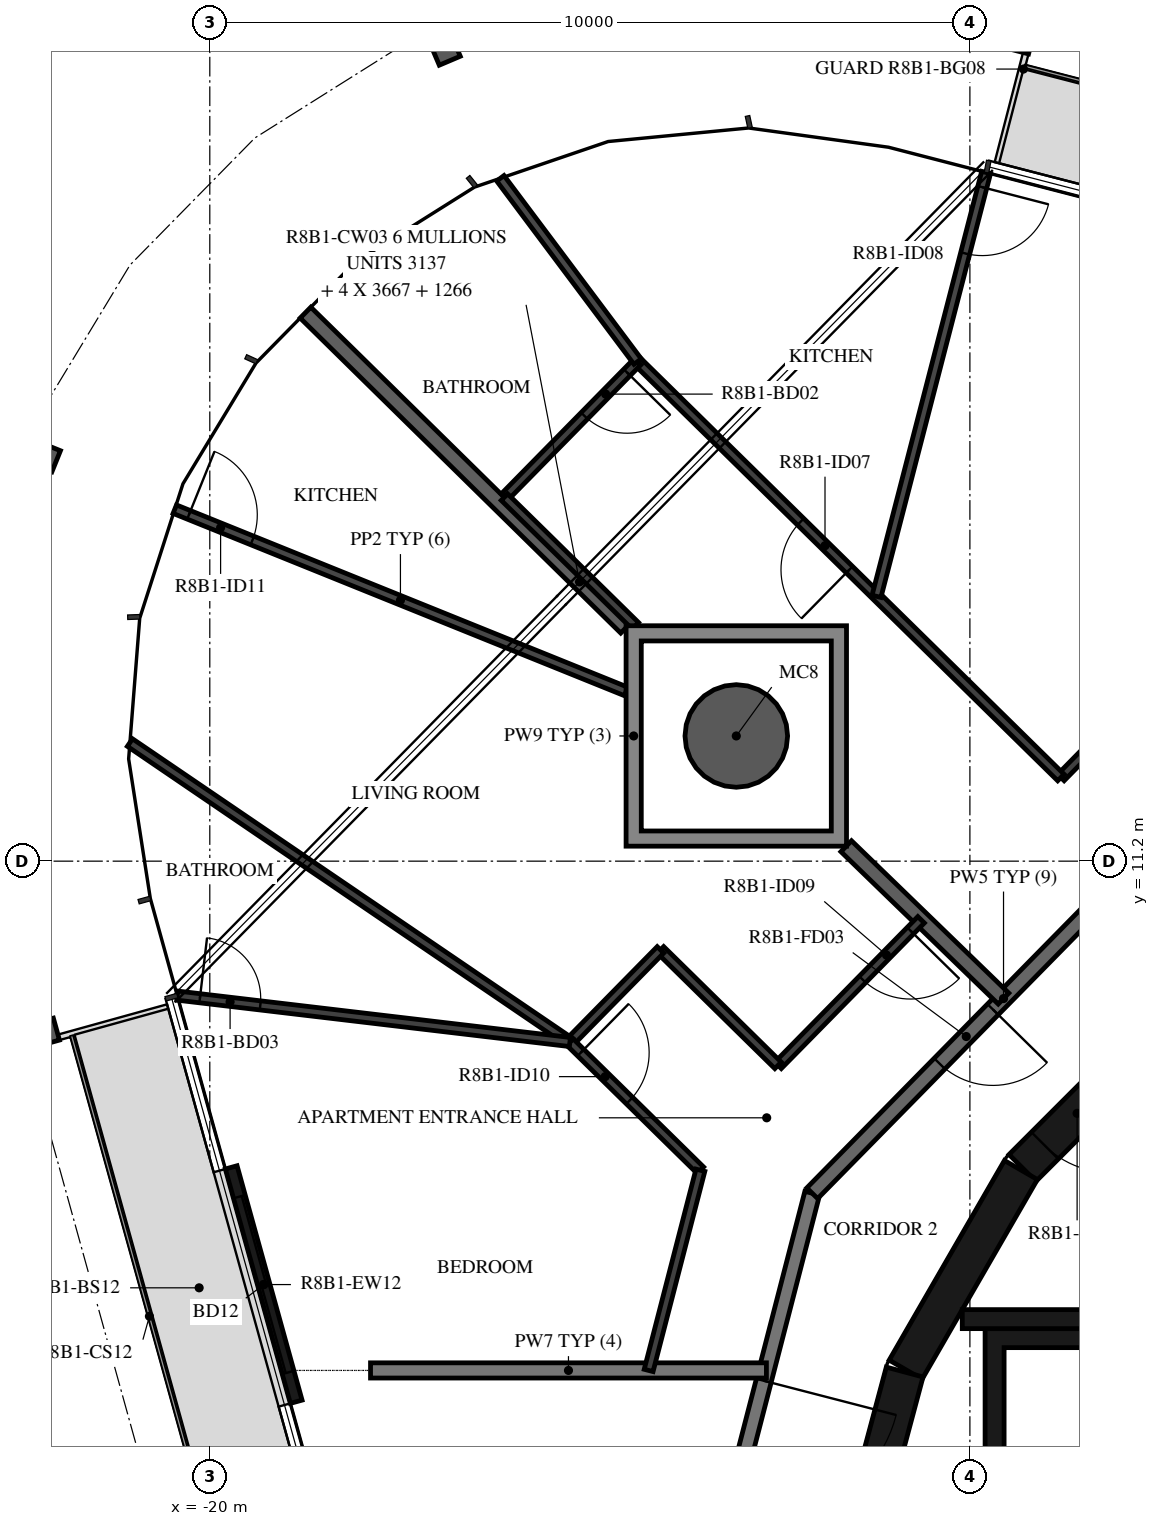
"""IFC4 building model, lengths in metres.
Left out: names, types, materials, properties, quantities, classifications, styles, units other than length and angle.
Written with IfcOpenShell. Run it as: python <this file> out.ifc"""

import sys

from ifc_helpers import new_model, si_unit, direction, frame, frame_2d, origin, origin_2d, place, context, subcontext, project, spatial, polyline, rectangle, hollow_circle, i_section, outline, extrude, element, fill, save


model = new_model("IFC4")
c1 = context("Model", 3, precision=1e-05, world=origin(), true_north=direction((0.0, 1.0)))
c2 = subcontext(c1, "Body", "Model", "MODEL_VIEW")
j1 = project(units=[si_unit("LENGTHUNIT", "METRE"), si_unit("PLANEANGLEUNIT", "RADIAN")], contexts=[c1])
p1 = place(None, origin())
s1 = spatial("IfcSite", under=j1, at=p1, CompositionType="ELEMENT")
p2 = place(p1, origin())
s2 = spatial("IfcBuilding", under=s1, at=p2, CompositionType="ELEMENT")
p3 = place(p2, frame((0.0, 0.0, 308.7)))
s3 = spatial("IfcBuildingStorey", under=s2, at=p3, CompositionType="ELEMENT", Elevation=308.7)
p4 = place(p3, frame((-13.073, 12.847, -0.38), z_axis=(0.0, 0.0, 1.0), x_axis=(1.0, 0.0, 0.0)))
e1 = element("IfcColumn", 1, at=p4, inside=s3, PredefinedType="COLUMN", context=c2, shape_type="SweptSolid", body=[
    extrude(hollow_circle(Radius=0.675, WallThickness=0.03, at=origin_2d()), origin(), (0.0, 0.0, 1.0), 3.5),
])
for number, where, z_axis, x_axis in (
    (2, (-9.261, 22.293, -0.38), (0.0, 0.0, 1.0), (0.968, -0.25, 0.0)),
    (3, (-17.019, 22.145, -0.38), (0.0, 0.0, 1.0), (0.921, 0.391, 0.0)),
    (4, (-22.438, 16.629, -0.38), (0.0, 0.0, 1.0), (0.374, 0.927, 0.0)),
    (5, (-22.452, 8.87, -0.38), (0.0, 0.0, 1.0), (-0.267, 0.964, 0.0)),
):
    element("IfcColumn", number, at=place(p3, frame(where, z_axis=z_axis, x_axis=x_axis)), inside=s3, PredefinedType="COLUMN", context=c2, shape_type="SweptSolid", body=[
        extrude(i_section(OverallWidth=0.3, OverallDepth=0.9, WebThickness=0.019, FlangeThickness=0.035, FilletRadius=0.03, at=origin_2d()), origin(), (0.0, 0.0, 1.0), 3.5),
    ])
p5 = place(p3, frame((-19.718, 7.171, 0.0), z_axis=(0.0, 0.0, 1.0), x_axis=(0.267266077957, -0.963622770369, 0.0)))
e6 = element("IfcWall", 6, at=p5, inside=s3, PredefinedType="STANDARD", context=c2, shape_type="SweptSolid", body=[
    extrude(rectangle(XDim=3.2, YDim=0.16, at=frame_2d((1.6, 0.0))), origin(), (0.0, 0.0, 1.0), 3.12),
])
p6 = place(p5, frame((0.4, 0.0, 0.0)))
e7 = element("IfcOpeningElement", 7, at=p6, cuts=e6, PredefinedType="OPENING", context=c2, shape_type="SweptSolid", body=[
    extrude(rectangle(XDim=2.4, YDim=2.4, at=frame_2d((1.2, 1.2))), frame((0.0, 0.09, 0.0), z_axis=(0.0, -1.0, 0.0), x_axis=(1.0, 0.0, 0.0)), (0.0, 0.0, 1.0), 0.18),
])
p7 = place(p3, frame((-7.164, 9.308, 0.0), z_axis=(0.0, 0.0, 1.0), x_axis=(-0.707106781187, -0.707106781187, 0.0)))
e8 = element("IfcWall", 8, at=p7, inside=s3, PredefinedType="SHEAR", context=c2, shape_type="SweptSolid", body=[
    extrude(rectangle(XDim=3.032, YDim=0.5, at=frame_2d((1.516, 0.0))), origin(), (0.0, 0.0, 1.0), 3.12),
])
p8 = place(p7, frame((1.416, 0.0, 0.0)))
e9 = element("IfcOpeningElement", 9, at=p8, cuts=e8, PredefinedType="OPENING", context=c2, shape_type="SweptSolid", body=[
    extrude(rectangle(XDim=1.2, YDim=2.1, at=frame_2d((0.6, 1.05))), frame((0.0, 0.26, 0.0), z_axis=(0.0, -1.0, 0.0), x_axis=(1.0, 0.0, 0.0)), (0.0, 0.0, 1.0), 0.52),
])
for number, where, z_axis, x_axis in (
    (10, (-9.329, 7.137, 0.0), (0.0, 0.0, 1.0), (-0.5, -0.866, 0.0)),
    (11, (-10.858, 4.479, 0.0), (0.0, 0.0, 1.0), (-0.259, -0.966, 0.0)),
):
    element("IfcWall", number, at=place(p3, frame(where, z_axis=z_axis, x_axis=x_axis)), inside=s3, PredefinedType="SHEAR", context=c2, shape_type="SweptSolid", body=[
        extrude(rectangle(XDim=3.033, YDim=0.5, at=frame_2d((1.516, 0.0))), origin(), (0.0, 0.0, 1.0), 3.12),
    ])
p9 = place(p3, frame((-7.0, 5.175, 0.0), z_axis=(0.0, 0.0, 1.0), x_axis=(-1.0, 0.0, 0.0)))
e12 = element("IfcWall", 12, at=p9, inside=s3, PredefinedType="SHEAR", context=c2, shape_type="SweptSolid", body=[
    extrude(rectangle(XDim=3.1, YDim=0.25, at=frame_2d((1.55, 0.0))), origin(), (0.0, 0.0, 1.0), 3.12),
])
p10 = place(p3, origin())
e13 = element("IfcWall", 13, at=p10, inside=s3, PredefinedType="SHEAR", context=c2, shape_type="SweptSolid", body=[
    extrude(outline(polyline([(-9.8, 1.9), (-9.55, 1.9), (-9.55, 4.8), (3.1, 4.8), (3.1, 1.9), (3.35, 1.9), (3.35, 4.8), (5.25, 4.8), (5.25, 1.9), (5.5, 1.9), (5.5, 4.8), (7.4, 4.8), (7.4, 1.9), (7.65, 1.9), (7.65, 4.8), (9.55, 4.8), (9.55, 1.9), (9.8, 1.9), (9.8, 4.8), (9.8, 5.05), (-9.8, 5.05), (-9.8, 4.8), (-9.8, 1.9)])), origin(), (0.0, 0.0, 1.0), 3.12),
])
p11 = place(p3, frame((-12.074, 6.831, 0.0), z_axis=(0.0, 0.0, 1.0), x_axis=(-0.250391063186, -0.968144780225, 0.0)))
e14 = element("IfcWall", 14, at=p11, inside=s3, PredefinedType="STANDARD", context=c2, shape_type="SweptSolid", body=[
    extrude(rectangle(XDim=7.181, YDim=0.2, at=frame_2d((3.591, 0.0))), origin(), (0.0, 0.0, 1.0), 3.12),
])
p12 = place(p11, frame((2.548, 0.0, 0.0)))
e15 = element("IfcOpeningElement", 15, at=p12, cuts=e14, PredefinedType="OPENING", context=c2, shape_type="SweptSolid", body=[
    extrude(rectangle(XDim=1.8, YDim=2.1, at=frame_2d((0.9, 1.05))), frame((0.0, 0.11, 0.0), z_axis=(0.0, -1.0, 0.0), x_axis=(1.0, 0.0, 0.0)), (0.0, 0.0, 1.0), 0.22),
])
p13 = place(p3, frame((-7.041, 11.953, 0.0), z_axis=(0.0, 0.0, 1.0), x_axis=(-0.70090916255, -0.713250549143, 0.0)))
e16 = element("IfcWall", 16, at=p13, inside=s3, PredefinedType="STANDARD", context=c2, shape_type="SweptSolid", body=[
    extrude(rectangle(XDim=7.181, YDim=0.2, at=frame_2d((3.59, 0.0))), origin(), (0.0, 0.0, 1.0), 3.12),
])
p14 = place(p13, frame((3.791, 0.0, 0.0)))
e17 = element("IfcOpeningElement", 17, at=p14, cuts=e16, PredefinedType="OPENING", context=c2, shape_type="SweptSolid", body=[
    extrude(rectangle(XDim=1.0, YDim=2.1, at=frame_2d((0.5, 1.05))), frame((0.0, 0.11, 0.0), z_axis=(0.0, -1.0, 0.0), x_axis=(1.0, 0.0, 0.0)), (0.0, 0.0, 1.0), 0.22),
])
p15 = place(p3, frame((-12.677, 4.5, 0.0), z_axis=(0.0, 0.0, 1.0), x_axis=(-1.0, 0.0, 0.0)))
e18 = element("IfcWall", 18, at=p15, inside=s3, PredefinedType="STANDARD", context=c2, shape_type="SweptSolid", body=[
    extrude(rectangle(XDim=5.208, YDim=0.2, at=frame_2d((2.604, 0.0))), origin(), (0.0, 0.0, 1.0), 3.12),
])
p16 = place(p3, frame((-11.627, 11.396, 0.0), z_axis=(0.0, 0.0, 1.0), x_axis=(0.718328882961, -0.695703683981, 0.0)))
e19 = element("IfcWall", 19, at=p16, inside=s3, PredefinedType="STANDARD", context=c2, shape_type="SweptSolid", body=[
    extrude(rectangle(XDim=2.881, YDim=0.2, at=frame_2d((1.44, 0.0))), origin(), (0.0, 0.0, 1.0), 3.12),
])
p17 = place(p3, frame((-18.741, 18.417, 0.0), z_axis=(0.0, 0.0, 1.0), x_axis=(0.713252414586, -0.700907264256, 0.0)))
e20 = element("IfcWall", 20, at=p17, inside=s3, PredefinedType="STANDARD", context=c2, shape_type="SweptSolid", body=[
    extrude(rectangle(XDim=5.913, YDim=0.2, at=frame_2d((2.957, 0.0))), origin(), (0.0, 0.0, 1.0), 3.12),
])
p18 = place(p3, frame((-7.829, 13.291, 0.0), z_axis=(0.0, 0.0, 1.0), x_axis=(-0.700840583087, -0.713317935494, 0.0)))
e21 = element("IfcWall", 21, at=p18, inside=s3, PredefinedType="PARTITIONING", context=c2, shape_type="SweptSolid", body=[
    extrude(rectangle(XDim=1.389, YDim=0.12, at=frame_2d((0.695, 0.0))), origin(), (0.0, 0.0, 1.0), 3.12),
])
p19 = place(p3, frame((-8.803, 12.3, 0.0), z_axis=(0.0, 0.0, 1.0), x_axis=(-0.713240430861, 0.700919458844, 0.0)))
e22 = element("IfcWall", 22, at=p19, inside=s3, PredefinedType="PARTITIONING", context=c2, shape_type="SweptSolid", body=[
    extrude(rectangle(XDim=7.807, YDim=0.12, at=frame_2d((3.904, 0.0))), origin(), (0.0, 0.0, 1.0), 3.12),
])
p20 = place(p19, frame((3.901, 0.0, 0.0)))
e23 = element("IfcOpeningElement", 23, at=p20, cuts=e22, PredefinedType="OPENING", context=c2, shape_type="SweptSolid", body=[
    extrude(rectangle(XDim=0.9, YDim=2.1, at=frame_2d((0.45, 1.05))), frame((0.0, 0.07, 0.0), z_axis=(0.0, -1.0, 0.0), x_axis=(1.0, 0.0, 0.0)), (0.0, 0.0, 1.0), 0.14),
])
p21 = place(p3, frame((-14.371, 17.772, 0.0), z_axis=(0.0, 0.0, 1.0), x_axis=(-0.700928101034, -0.713231937859, 0.0)))
e24 = element("IfcWall", 24, at=p21, inside=s3, PredefinedType="PARTITIONING", context=c2, shape_type="SweptSolid", body=[
    extrude(rectangle(XDim=2.5, YDim=0.12, at=frame_2d((1.25, 0.0))), origin(), (0.0, 0.0, 1.0), 3.12),
])
p22 = place(p21, frame((0.2, 0.0, 0.0)))
e25 = element("IfcOpeningElement", 25, at=p22, cuts=e24, PredefinedType="OPENING", context=c2, shape_type="SweptSolid", body=[
    extrude(rectangle(XDim=0.8, YDim=2.1, at=frame_2d((0.4, 1.05))), frame((0.0, 0.07, 0.0), z_axis=(0.0, -1.0, 0.0), x_axis=(1.0, 0.0, 0.0)), (0.0, 0.0, 1.0), 0.14),
])
p23 = place(p3, frame((-16.124, 15.989, 0.0), z_axis=(0.0, 0.0, 1.0), x_axis=(0.713298294795, -0.700860572898, 0.0)))
e26 = element("IfcWall", 26, at=p23, inside=s3, PredefinedType="PARTITIONING", context=c2, shape_type="SweptSolid", body=[
    extrude(rectangle(XDim=2.414, YDim=0.12, at=frame_2d((1.207, 0.0))), origin(), (0.0, 0.0, 1.0), 3.12),
])
p24 = place(p3, frame((-9.787, 20.26, 0.0), z_axis=(0.0, 0.0, 1.0), x_axis=(-0.250397207818, -0.968143191019, 0.0)))
e27 = element("IfcWall", 27, at=p24, inside=s3, PredefinedType="PARTITIONING", context=c2, shape_type="SweptSolid", body=[
    extrude(rectangle(XDim=5.76, YDim=0.12, at=frame_2d((2.88, 0.0))), origin(), (0.0, 0.0, 1.0), 2.73),
])
p25 = place(p24, frame((0.2, 0.0, 0.0)))
e28 = element("IfcOpeningElement", 28, at=p25, cuts=e27, PredefinedType="OPENING", context=c2, shape_type="SweptSolid", body=[
    extrude(rectangle(XDim=0.9, YDim=2.1, at=frame_2d((0.45, 1.05))), frame((0.0, 0.07, 0.0), z_axis=(0.0, -1.0, 0.0), x_axis=(1.0, 0.0, 0.0)), (0.0, 0.0, 1.0), 0.14),
])
p26 = place(p3, frame((-16.177, 20.184, 0.0), z_axis=(0.0, 0.0, 1.0), x_axis=(0.599546131574, -0.800340200237, 0.0)))
e29 = element("IfcWall", 29, at=p26, inside=s3, PredefinedType="PARTITIONING", context=c2, shape_type="SweptSolid", body=[
    extrude(rectangle(XDim=3.013, YDim=0.12, at=frame_2d((1.506, 0.0))), origin(), (0.0, 0.0, 1.0), 2.73),
])
p27 = place(p3, frame((-10.642, 10.429, 0.0), z_axis=(0.0, 0.0, 1.0), x_axis=(-0.700897237058, -0.713262268092, 0.0)))
e30 = element("IfcWall", 30, at=p27, inside=s3, PredefinedType="PARTITIONING", context=c2, shape_type="SweptSolid", body=[
    extrude(rectangle(XDim=2.685, YDim=0.12, at=frame_2d((1.343, 0.0))), origin(), (0.0, 0.0, 1.0), 3.12),
])
p28 = place(p27, frame((0.2, 0.0, 0.0)))
e31 = element("IfcOpeningElement", 31, at=p28, cuts=e30, PredefinedType="OPENING", context=c2, shape_type="SweptSolid", body=[
    extrude(rectangle(XDim=0.9, YDim=2.1, at=frame_2d((0.45, 1.05))), frame((0.0, 0.07, 0.0), z_axis=(0.0, -1.0, 0.0), x_axis=(1.0, 0.0, 0.0)), (0.0, 0.0, 1.0), 0.14),
])
p29 = place(p3, frame((-12.524, 8.513, 0.0), z_axis=(0.0, 0.0, 1.0), x_axis=(-0.713272241211, 0.700887087852, 0.0)))
e32 = element("IfcWall", 32, at=p29, inside=s3, PredefinedType="PARTITIONING", context=c2, shape_type="SweptSolid", body=[
    extrude(rectangle(XDim=2.168, YDim=0.12, at=frame_2d((1.084, 0.0))), origin(), (0.0, 0.0, 1.0), 3.12),
])
p30 = place(p3, frame((-14.071, 10.033, 0.0), z_axis=(0.0, 0.0, 1.0), x_axis=(-0.700903812832, -0.713255806255, 0.0)))
e33 = element("IfcWall", 33, at=p30, inside=s3, PredefinedType="PARTITIONING", context=c2, shape_type="SweptSolid", body=[
    extrude(rectangle(XDim=1.7, YDim=0.12, at=frame_2d((0.85, 0.0))), origin(), (0.0, 0.0, 1.0), 3.12),
])
p31 = place(p3, frame((-15.262, 8.821, 0.0), z_axis=(0.0, 0.0, 1.0), x_axis=(0.713216332019, -0.700943980459, 0.0)))
e34 = element("IfcWall", 34, at=p31, inside=s3, PredefinedType="PARTITIONING", context=c2, shape_type="SweptSolid", body=[
    extrude(rectangle(XDim=2.407, YDim=0.12, at=frame_2d((1.204, 0.0))), origin(), (0.0, 0.0, 1.0), 3.12),
])
p32 = place(p31, frame((0.2, 0.0, 0.0)))
e35 = element("IfcOpeningElement", 35, at=p32, cuts=e34, PredefinedType="OPENING", context=c2, shape_type="SweptSolid", body=[
    extrude(rectangle(XDim=0.9, YDim=2.1, at=frame_2d((0.45, 1.05))), frame((0.0, 0.07, 0.0), z_axis=(0.0, -1.0, 0.0), x_axis=(1.0, 0.0, 0.0)), (0.0, 0.0, 1.0), 0.14),
])
p33 = place(p3, frame((-13.545, 7.134, 0.0), z_axis=(0.0, 0.0, 1.0), x_axis=(-0.250320452157, -0.968163039592, 0.0)))
e36 = element("IfcWall", 36, at=p33, inside=s3, PredefinedType="PARTITIONING", context=c2, shape_type="SweptSolid", body=[
    extrude(rectangle(XDim=2.72, YDim=0.12, at=frame_2d((1.36, 0.0))), origin(), (0.0, 0.0, 1.0), 3.12),
])
p34 = place(p3, frame((-20.46, 15.831, 0.0), z_axis=(0.0, 0.0, 1.0), x_axis=(0.927230380144, -0.374491417977, 0.0)))
e37 = element("IfcWall", 37, at=p34, inside=s3, PredefinedType="PARTITIONING", context=c2, shape_type="SweptSolid", body=[
    extrude(rectangle(XDim=6.403, YDim=0.12, at=frame_2d((3.202, 0.0))), origin(), (0.0, 0.0, 1.0), 2.73),
])
p35 = place(p34, frame((0.2, 0.0, 0.0)))
e38 = element("IfcOpeningElement", 38, at=p35, cuts=e37, PredefinedType="OPENING", context=c2, shape_type="SweptSolid", body=[
    extrude(rectangle(XDim=0.9, YDim=2.1, at=frame_2d((0.45, 1.05))), frame((0.0, 0.07, 0.0), z_axis=(0.0, -1.0, 0.0), x_axis=(1.0, 0.0, 0.0)), (0.0, 0.0, 1.0), 0.14),
])
p36 = place(p3, frame((-21.051, 12.76, 0.0), z_axis=(0.0, 0.0, 1.0), x_axis=(0.826728647395, -0.562600874134, 0.0)))
e39 = element("IfcWall", 39, at=p36, inside=s3, PredefinedType="PARTITIONING", context=c2, shape_type="SweptSolid", body=[
    extrude(rectangle(XDim=7.002, YDim=0.12, at=frame_2d((3.501, 0.0))), origin(), (0.0, 0.0, 1.0), 3.12),
])
p37 = place(p3, frame((-20.428, 9.431, 0.0), z_axis=(0.0, 0.0, 1.0), x_axis=(0.993086702471, -0.117383139226, 0.0)))
e40 = element("IfcWall", 40, at=p37, inside=s3, PredefinedType="PARTITIONING", context=c2, shape_type="SweptSolid", body=[
    extrude(rectangle(XDim=5.202, YDim=0.12, at=frame_2d((2.601, 0.0))), origin(), (0.0, 0.0, 1.0), 3.12),
])
p38 = place(p37, frame((0.3, 0.0, 0.0)))
e41 = element("IfcOpeningElement", 41, at=p38, cuts=e40, PredefinedType="OPENING", context=c2, shape_type="SweptSolid", body=[
    extrude(rectangle(XDim=0.8, YDim=2.1, at=frame_2d((0.4, 1.05))), frame((0.0, 0.07, 0.0), z_axis=(0.0, -1.0, 0.0), x_axis=(1.0, 0.0, 0.0)), (0.0, 0.0, 1.0), 0.14),
])
p39 = place(p3, origin())
e42 = element("IfcWall", 42, at=p39, inside=s3, PredefinedType="STANDARD", context=c2, shape_type="SweptSolid", body=[
    extrude(outline(polyline([(-11.623, 14.297), (-11.623, 11.397), (-14.523, 11.397), (-14.523, 14.297), (-11.623, 14.297)]), holes=[polyline([(-14.323, 11.597), (-11.823, 11.597), (-11.823, 14.097), (-14.323, 14.097), (-14.323, 11.597)])]), origin(), (0.0, 0.0, 1.0), 3.12),
])
p40 = place(p6, origin())
e43 = element("IfcDoor", 43, at=p40, inside=s3, OperationType="DOUBLE_DOOR_SLIDING", PredefinedType="DOOR", context=c2, shape_type="SweptSolid", body=[
    extrude(rectangle(XDim=2.4, YDim=2.4, at=frame_2d((1.2, 1.2))), frame((0.0, 0.025, 0.0), z_axis=(0.0, -1.0, 0.0), x_axis=(1.0, 0.0, 0.0)), (0.0, 0.0, 1.0), 0.05),
])
fill(e7, e43)
p41 = place(p8, origin())
e44 = element("IfcDoor", 44, at=p41, inside=s3, OperationType="SINGLE_SWING_RIGHT", PredefinedType="DOOR", context=c2, shape_type="SweptSolid", body=[
    extrude(rectangle(XDim=1.2, YDim=2.1, at=frame_2d((0.6, 1.05))), frame((0.0, 0.025, 0.0), z_axis=(0.0, -1.0, 0.0), x_axis=(1.0, 0.0, 0.0)), (0.0, 0.0, 1.0), 0.05),
])
fill(e9, e44)
p42 = place(p20, origin())
e45 = element("IfcDoor", 45, at=p42, inside=s3, OperationType="SINGLE_SWING_LEFT", PredefinedType="DOOR", context=c2, shape_type="SweptSolid", body=[
    extrude(rectangle(XDim=0.9, YDim=2.1, at=frame_2d((0.45, 1.05))), frame((0.0, 0.025, 0.0), z_axis=(0.0, -1.0, 0.0), x_axis=(1.0, 0.0, 0.0)), (0.0, 0.0, 1.0), 0.05),
])
fill(e23, e45)
p43 = place(p22, origin())
e46 = element("IfcDoor", 46, at=p43, inside=s3, OperationType="SINGLE_SWING_RIGHT", PredefinedType="DOOR", context=c2, shape_type="SweptSolid", body=[
    extrude(rectangle(XDim=0.8, YDim=2.1, at=frame_2d((0.4, 1.05))), frame((0.0, 0.025, 0.0), z_axis=(0.0, -1.0, 0.0), x_axis=(1.0, 0.0, 0.0)), (0.0, 0.0, 1.0), 0.05),
])
fill(e25, e46)
p44 = place(p25, origin())
e47 = element("IfcDoor", 47, at=p44, inside=s3, OperationType="SINGLE_SWING_RIGHT", PredefinedType="DOOR", context=c2, shape_type="SweptSolid", body=[
    extrude(rectangle(XDim=0.9, YDim=2.1, at=frame_2d((0.45, 1.05))), frame((0.0, 0.025, 0.0), z_axis=(0.0, -1.0, 0.0), x_axis=(1.0, 0.0, 0.0)), (0.0, 0.0, 1.0), 0.05),
])
fill(e28, e47)
p45 = place(p14, origin())
e48 = element("IfcDoor", 48, at=p45, inside=s3, OperationType="SINGLE_SWING_LEFT", PredefinedType="DOOR", context=c2, shape_type="SweptSolid", body=[
    extrude(rectangle(XDim=1.0, YDim=2.1, at=frame_2d((0.5, 1.05))), frame((0.0, 0.025, 0.0), z_axis=(0.0, -1.0, 0.0), x_axis=(1.0, 0.0, 0.0)), (0.0, 0.0, 1.0), 0.05),
])
fill(e17, e48)
p46 = place(p28, origin())
e49 = element("IfcDoor", 49, at=p46, inside=s3, OperationType="SINGLE_SWING_LEFT", PredefinedType="DOOR", context=c2, shape_type="SweptSolid", body=[
    extrude(rectangle(XDim=0.9, YDim=2.1, at=frame_2d((0.45, 1.05))), frame((0.0, 0.025, 0.0), z_axis=(0.0, -1.0, 0.0), x_axis=(1.0, 0.0, 0.0)), (0.0, 0.0, 1.0), 0.05),
])
fill(e31, e49)
p47 = place(p32, origin())
e50 = element("IfcDoor", 50, at=p47, inside=s3, OperationType="SINGLE_SWING_LEFT", PredefinedType="DOOR", context=c2, shape_type="SweptSolid", body=[
    extrude(rectangle(XDim=0.9, YDim=2.1, at=frame_2d((0.45, 1.05))), frame((0.0, 0.025, 0.0), z_axis=(0.0, -1.0, 0.0), x_axis=(1.0, 0.0, 0.0)), (0.0, 0.0, 1.0), 0.05),
])
fill(e35, e50)
p48 = place(p35, origin())
e51 = element("IfcDoor", 51, at=p48, inside=s3, OperationType="SINGLE_SWING_LEFT", PredefinedType="DOOR", context=c2, shape_type="SweptSolid", body=[
    extrude(rectangle(XDim=0.9, YDim=2.1, at=frame_2d((0.45, 1.05))), frame((0.0, 0.025, 0.0), z_axis=(0.0, -1.0, 0.0), x_axis=(1.0, 0.0, 0.0)), (0.0, 0.0, 1.0), 0.05),
])
fill(e38, e51)
p49 = place(p38, origin())
e52 = element("IfcDoor", 52, at=p49, inside=s3, OperationType="SINGLE_SWING_LEFT", PredefinedType="DOOR", context=c2, shape_type="SweptSolid", body=[
    extrude(rectangle(XDim=0.8, YDim=2.1, at=frame_2d((0.4, 1.05))), frame((0.0, 0.025, 0.0), z_axis=(0.0, -1.0, 0.0), x_axis=(1.0, 0.0, 0.0)), (0.0, 0.0, 1.0), 0.05),
])
fill(e41, e52)
p50 = place(p12, origin())
e53 = element("IfcDoor", 53, at=p50, inside=s3, OperationType="DOUBLE_DOOR_SINGLE_SWING", PredefinedType="DOOR", context=c2, shape_type="SweptSolid", body=[
    extrude(rectangle(XDim=1.8, YDim=2.1, at=frame_2d((0.9, 1.05))), frame((0.0, 0.025, 0.0), z_axis=(0.0, -1.0, 0.0), x_axis=(1.0, 0.0, 0.0)), (0.0, 0.0, 1.0), 0.05),
])
fill(e15, e53)
save(model, sys.argv[1])
